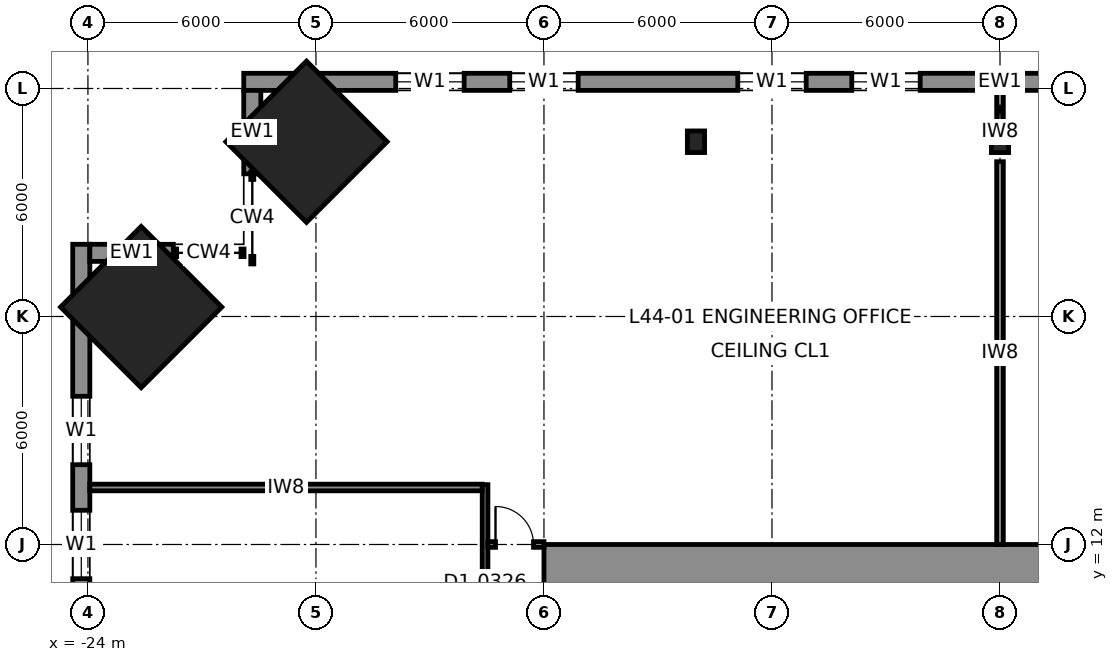
"""IFC4 building model, lengths in metres.
Left out: names, types, materials, properties, quantities, classifications, styles, units other than length and angle.
Written with IfcOpenShell. Run it as: python <this file> out.ifc"""

import sys

from ifc_helpers import new_model, si_unit, direction, frame, frame_2d, origin, origin_2d, place, context, subcontext, project, spatial, rectangle, i_section, extrude, element, fill, save


model = new_model("IFC4")
c1 = context("Model", 3, precision=1e-05, world=origin(), true_north=direction((0.0, 1.0)))
c2 = subcontext(c1, "Body", "Model", "MODEL_VIEW")
j1 = project(units=[si_unit("LENGTHUNIT", "METRE"), si_unit("PLANEANGLEUNIT", "RADIAN")], contexts=[c1])
p1 = place(None, origin())
s1 = spatial("IfcSite", under=j1, at=p1, CompositionType="ELEMENT")
p2 = place(p1, origin())
s2 = spatial("IfcBuilding", under=s1, at=p2, CompositionType="ELEMENT")
p3 = place(p2, frame((0.0, 0.0, 205.8)))
s3 = spatial("IfcBuildingStorey", under=s2, at=p3, CompositionType="ELEMENT", Elevation=205.8)
for number, where, z_axis, x_axis in (
    (1, (-22.598, 18.248, 0.0), (0.04, -0.04, 0.998), (0.707, 0.708, 0.0)),
    (2, (-18.248, 22.598, 0.0), (0.04, -0.04, 0.998), (0.708, 0.707, 0.0)),
):
    element("IfcColumn", number, at=place(p3, frame(where, z_axis=z_axis, x_axis=x_axis)), inside=s3, PredefinedType="COLUMN", context=c2, shape_type="SweptSolid", body=[
        extrude(rectangle(XDim=3.0, YDim=3.0, at=origin_2d()), origin(), (0.0, 0.0, 1.0), 4.007),
    ])
for number, where, z_axis, x_axis in (
    (3, (0.0, 22.598, 0.0), (0.0, -0.04, 0.999), (1.0, 0.0, 0.0)),
    (4, (-8.0, 22.598, 0.0), (0.0, -0.04, 0.999), (1.0, 0.0, 0.0)),
):
    element("IfcColumn", number, at=place(p3, frame(where, z_axis=z_axis, x_axis=x_axis)), inside=s3, PredefinedType="COLUMN", context=c2, shape_type="SweptSolid", body=[
        extrude(i_section(OverallWidth=0.454, OverallDepth=0.569, WebThickness=0.078, FlangeThickness=0.125, at=origin_2d()), origin(), (0.0, 0.0, 1.0), 4.003),
    ])
p4 = place(p3, frame((-12.0, 11.25, 0.0), z_axis=(0.0, 0.0, 1.0), x_axis=(1.0, 0.0, 0.0)))
e5 = element("IfcWall", 5, at=p4, inside=s3, PredefinedType="SHEAR", context=c2, shape_type="SweptSolid", body=[
    extrude(rectangle(XDim=24.0, YDim=1.5, at=frame_2d((12.0, 0.0))), origin(), (0.0, 0.0, 1.0), 4.0),
])
p5 = place(p3, frame((19.9, 24.175, 0.0), z_axis=(0.0, 0.0, 1.0), x_axis=(-1.0, 0.0, 0.0)))
e6 = element("IfcWall", 6, at=p5, inside=s3, PredefinedType="SOLIDWALL", context=c2, shape_type="SweptSolid", body=[
    extrude(rectangle(XDim=39.8, YDim=0.45, at=frame_2d((19.9, 0.0))), origin(), (0.0, 0.0, 1.0), 3.83),
])
p6 = place(p5, frame((4.0, 0.0, 0.7)))
e7 = element("IfcOpeningElement", 7, at=p6, cuts=e6, PredefinedType="OPENING", context=c2, shape_type="SweptSolid", body=[
    extrude(rectangle(XDim=1.8, YDim=2.6, at=frame_2d((0.9, 1.3))), frame((0.0, 0.235, 0.0), z_axis=(0.0, -1.0, 0.0), x_axis=(1.0, 0.0, 0.0)), (0.0, 0.0, 1.0), 0.47),
])
p7 = place(p5, frame((7.0, 0.0, 0.7)))
e8 = element("IfcOpeningElement", 8, at=p7, cuts=e6, PredefinedType="OPENING", context=c2, shape_type="SweptSolid", body=[
    extrude(rectangle(XDim=1.8, YDim=2.6, at=frame_2d((0.9, 1.3))), frame((0.0, 0.235, 0.0), z_axis=(0.0, -1.0, 0.0), x_axis=(1.0, 0.0, 0.0)), (0.0, 0.0, 1.0), 0.47),
])
p8 = place(p5, frame((13.0, 0.0, 0.7)))
e9 = element("IfcOpeningElement", 9, at=p8, cuts=e6, PredefinedType="OPENING", context=c2, shape_type="SweptSolid", body=[
    extrude(rectangle(XDim=1.8, YDim=2.6, at=frame_2d((0.9, 1.3))), frame((0.0, 0.235, 0.0), z_axis=(0.0, -1.0, 0.0), x_axis=(1.0, 0.0, 0.0)), (0.0, 0.0, 1.0), 0.47),
])
p9 = place(p5, frame((16.0, 0.0, 0.7)))
e10 = element("IfcOpeningElement", 10, at=p9, cuts=e6, PredefinedType="OPENING", context=c2, shape_type="SweptSolid", body=[
    extrude(rectangle(XDim=1.8, YDim=2.6, at=frame_2d((0.9, 1.3))), frame((0.0, 0.235, 0.0), z_axis=(0.0, -1.0, 0.0), x_axis=(1.0, 0.0, 0.0)), (0.0, 0.0, 1.0), 0.47),
])
p10 = place(p5, frame((22.0, 0.0, 0.7)))
e11 = element("IfcOpeningElement", 11, at=p10, cuts=e6, PredefinedType="OPENING", context=c2, shape_type="SweptSolid", body=[
    extrude(rectangle(XDim=1.8, YDim=2.6, at=frame_2d((0.9, 1.3))), frame((0.0, 0.235, 0.0), z_axis=(0.0, -1.0, 0.0), x_axis=(1.0, 0.0, 0.0)), (0.0, 0.0, 1.0), 0.47),
])
p11 = place(p5, frame((25.0, 0.0, 0.7)))
e12 = element("IfcOpeningElement", 12, at=p11, cuts=e6, PredefinedType="OPENING", context=c2, shape_type="SweptSolid", body=[
    extrude(rectangle(XDim=1.8, YDim=2.6, at=frame_2d((0.9, 1.3))), frame((0.0, 0.235, 0.0), z_axis=(0.0, -1.0, 0.0), x_axis=(1.0, 0.0, 0.0)), (0.0, 0.0, 1.0), 0.47),
])
p12 = place(p5, frame((31.0, 0.0, 0.7)))
e13 = element("IfcOpeningElement", 13, at=p12, cuts=e6, PredefinedType="OPENING", context=c2, shape_type="SweptSolid", body=[
    extrude(rectangle(XDim=1.8, YDim=2.6, at=frame_2d((0.9, 1.3))), frame((0.0, 0.235, 0.0), z_axis=(0.0, -1.0, 0.0), x_axis=(1.0, 0.0, 0.0)), (0.0, 0.0, 1.0), 0.47),
])
p13 = place(p5, frame((34.0, 0.0, 0.7)))
e14 = element("IfcOpeningElement", 14, at=p13, cuts=e6, PredefinedType="OPENING", context=c2, shape_type="SweptSolid", body=[
    extrude(rectangle(XDim=1.8, YDim=2.6, at=frame_2d((0.9, 1.3))), frame((0.0, 0.235, 0.0), z_axis=(0.0, -1.0, 0.0), x_axis=(1.0, 0.0, 0.0)), (0.0, 0.0, 1.0), 0.47),
])
p14 = place(p3, frame((-24.175, 19.9, 0.0), z_axis=(0.0, 0.0, 1.0), x_axis=(0.0, -1.0, 0.0)))
e15 = element("IfcWall", 15, at=p14, inside=s3, PredefinedType="SOLIDWALL", context=c2, shape_type="SweptSolid", body=[
    extrude(rectangle(XDim=39.8, YDim=0.45, at=frame_2d((19.9, 0.0))), origin(), (0.0, 0.0, 1.0), 3.83),
])
p15 = place(p14, frame((4.0, 0.0, 0.7)))
e16 = element("IfcOpeningElement", 16, at=p15, cuts=e15, PredefinedType="OPENING", context=c2, shape_type="SweptSolid", body=[
    extrude(rectangle(XDim=1.8, YDim=2.6, at=frame_2d((0.9, 1.3))), frame((0.0, 0.235, 0.0), z_axis=(0.0, -1.0, 0.0), x_axis=(1.0, 0.0, 0.0)), (0.0, 0.0, 1.0), 0.47),
])
p16 = place(p14, frame((7.0, 0.0, 0.7)))
e17 = element("IfcOpeningElement", 17, at=p16, cuts=e15, PredefinedType="OPENING", context=c2, shape_type="SweptSolid", body=[
    extrude(rectangle(XDim=1.8, YDim=2.6, at=frame_2d((0.9, 1.3))), frame((0.0, 0.235, 0.0), z_axis=(0.0, -1.0, 0.0), x_axis=(1.0, 0.0, 0.0)), (0.0, 0.0, 1.0), 0.47),
])
p17 = place(p14, frame((13.0, 0.0, 0.7)))
e18 = element("IfcOpeningElement", 18, at=p17, cuts=e15, PredefinedType="OPENING", context=c2, shape_type="SweptSolid", body=[
    extrude(rectangle(XDim=1.8, YDim=2.6, at=frame_2d((0.9, 1.3))), frame((0.0, 0.235, 0.0), z_axis=(0.0, -1.0, 0.0), x_axis=(1.0, 0.0, 0.0)), (0.0, 0.0, 1.0), 0.47),
])
p18 = place(p14, frame((16.0, 0.0, 0.7)))
e19 = element("IfcOpeningElement", 19, at=p18, cuts=e15, PredefinedType="OPENING", context=c2, shape_type="SweptSolid", body=[
    extrude(rectangle(XDim=1.8, YDim=2.6, at=frame_2d((0.9, 1.3))), frame((0.0, 0.235, 0.0), z_axis=(0.0, -1.0, 0.0), x_axis=(1.0, 0.0, 0.0)), (0.0, 0.0, 1.0), 0.47),
])
p19 = place(p14, frame((22.0, 0.0, 0.7)))
e20 = element("IfcOpeningElement", 20, at=p19, cuts=e15, PredefinedType="OPENING", context=c2, shape_type="SweptSolid", body=[
    extrude(rectangle(XDim=1.8, YDim=2.6, at=frame_2d((0.9, 1.3))), frame((0.0, 0.235, 0.0), z_axis=(0.0, -1.0, 0.0), x_axis=(1.0, 0.0, 0.0)), (0.0, 0.0, 1.0), 0.47),
])
p20 = place(p14, frame((25.0, 0.0, 0.7)))
e21 = element("IfcOpeningElement", 21, at=p20, cuts=e15, PredefinedType="OPENING", context=c2, shape_type="SweptSolid", body=[
    extrude(rectangle(XDim=1.8, YDim=2.6, at=frame_2d((0.9, 1.3))), frame((0.0, 0.235, 0.0), z_axis=(0.0, -1.0, 0.0), x_axis=(1.0, 0.0, 0.0)), (0.0, 0.0, 1.0), 0.47),
])
p21 = place(p14, frame((31.0, 0.0, 0.7)))
e22 = element("IfcOpeningElement", 22, at=p21, cuts=e15, PredefinedType="OPENING", context=c2, shape_type="SweptSolid", body=[
    extrude(rectangle(XDim=1.8, YDim=2.6, at=frame_2d((0.9, 1.3))), frame((0.0, 0.235, 0.0), z_axis=(0.0, -1.0, 0.0), x_axis=(1.0, 0.0, 0.0)), (0.0, 0.0, 1.0), 0.47),
])
p22 = place(p14, frame((34.0, 0.0, 0.7)))
e23 = element("IfcOpeningElement", 23, at=p22, cuts=e15, PredefinedType="OPENING", context=c2, shape_type="SweptSolid", body=[
    extrude(rectangle(XDim=1.8, YDim=2.6, at=frame_2d((0.9, 1.3))), frame((0.0, 0.235, 0.0), z_axis=(0.0, -1.0, 0.0), x_axis=(1.0, 0.0, 0.0)), (0.0, 0.0, 1.0), 0.47),
])
for number, where, z_axis, x_axis in (
    (24, (-19.675, 21.754, 0.0), (0.0, 0.0, 1.0), (0.0, 1.0, 0.0)),
    (25, (-21.754, 19.675, 0.0), (0.0, 0.0, 1.0), (-1.0, 0.0, 0.0)),
):
    element("IfcWall", number, at=place(p3, frame(where, z_axis=z_axis, x_axis=x_axis)), inside=s3, PredefinedType="SOLIDWALL", context=c2, shape_type="SweptSolid", body=[
        extrude(rectangle(XDim=2.196, YDim=0.45, at=frame_2d((1.098, 0.0))), origin(), (0.0, 0.0, 1.0), 3.83),
    ])
p23 = place(p3, frame((-13.55, 13.575, 0.0), z_axis=(0.0, 0.0, 1.0), x_axis=(0.0, -1.0, 0.0)))
e26 = element("IfcWall", 26, at=p23, inside=s3, PredefinedType="PARTITIONING", context=c2, shape_type="SweptSolid", body=[
    extrude(rectangle(XDim=27.15, YDim=0.15, at=frame_2d((13.575, 0.0))), origin(), (0.0, 0.0, 1.0), 3.83),
])
p24 = place(p23, frame((22.975, 0.0, 0.0)))
e27 = element("IfcOpeningElement", 27, at=p24, cuts=e26, PredefinedType="OPENING", context=c2, shape_type="SweptSolid", body=[
    extrude(rectangle(XDim=1.0, YDim=2.3, at=frame_2d((0.5, 1.15))), frame((0.0, 0.085, 0.0), z_axis=(0.0, -1.0, 0.0), x_axis=(1.0, 0.0, 0.0)), (0.0, 0.0, 1.0), 0.17),
])
p25 = place(p23, frame((19.775, 0.0, 0.0)))
e28 = element("IfcOpeningElement", 28, at=p25, cuts=e26, PredefinedType="OPENING", context=c2, shape_type="SweptSolid", body=[
    extrude(rectangle(XDim=1.0, YDim=2.3, at=frame_2d((0.5, 1.15))), frame((0.0, 0.085, 0.0), z_axis=(0.0, -1.0, 0.0), x_axis=(1.0, 0.0, 0.0)), (0.0, 0.0, 1.0), 0.17),
])
p26 = place(p23, frame((11.525, 0.0, 0.0)))
e29 = element("IfcOpeningElement", 29, at=p26, cuts=e26, PredefinedType="OPENING", context=c2, shape_type="SweptSolid", body=[
    extrude(rectangle(XDim=1.0, YDim=2.3, at=frame_2d((0.5, 1.15))), frame((0.0, 0.085, 0.0), z_axis=(0.0, -1.0, 0.0), x_axis=(1.0, 0.0, 0.0)), (0.0, 0.0, 1.0), 0.17),
])
p27 = place(p23, frame((3.175, 0.0, 0.0)))
e30 = element("IfcOpeningElement", 30, at=p27, cuts=e26, PredefinedType="OPENING", context=c2, shape_type="SweptSolid", body=[
    extrude(rectangle(XDim=1.0, YDim=2.3, at=frame_2d((0.5, 1.15))), frame((0.0, 0.085, 0.0), z_axis=(0.0, -1.0, 0.0), x_axis=(1.0, 0.0, 0.0)), (0.0, 0.0, 1.0), 0.17),
])
p28 = place(p23, frame((16.825, 0.0, 0.0)))
e31 = element("IfcOpeningElement", 31, at=p28, cuts=e26, PredefinedType="OPENING", context=c2, shape_type="SweptSolid", body=[
    extrude(rectangle(XDim=1.0, YDim=2.3, at=frame_2d((0.5, 1.15))), frame((0.0, 0.085, 0.0), z_axis=(0.0, -1.0, 0.0), x_axis=(1.0, 0.0, 0.0)), (0.0, 0.0, 1.0), 0.17),
])
p29 = place(p23, frame((8.325, 0.0, 0.0)))
e32 = element("IfcOpeningElement", 32, at=p29, cuts=e26, PredefinedType="OPENING", context=c2, shape_type="SweptSolid", body=[
    extrude(rectangle(XDim=1.0, YDim=2.3, at=frame_2d((0.5, 1.15))), frame((0.0, 0.085, 0.0), z_axis=(0.0, -1.0, 0.0), x_axis=(1.0, 0.0, 0.0)), (0.0, 0.0, 1.0), 0.17),
])
p30 = place(p3, frame((-13.475, 12.0, 0.0), z_axis=(0.0, 0.0, 1.0), x_axis=(1.0, 0.0, 0.0)))
e33 = element("IfcWall", 33, at=p30, inside=s3, PredefinedType="PARTITIONING", context=c2, shape_type="SweptSolid", body=[
    extrude(rectangle(XDim=1.475, YDim=0.15, at=frame_2d((0.738, 0.0))), origin(), (0.0, 0.0, 1.0), 3.83),
])
p31 = place(p30, frame((0.2, 0.0, 0.0)))
e34 = element("IfcOpeningElement", 34, at=p31, cuts=e33, PredefinedType="OPENING", context=c2, shape_type="SweptSolid", body=[
    extrude(rectangle(XDim=1.0, YDim=2.3, at=frame_2d((0.5, 1.15))), frame((0.0, 0.085, 0.0), z_axis=(0.0, -1.0, 0.0), x_axis=(1.0, 0.0, 0.0)), (0.0, 0.0, 1.0), 0.17),
])
p32 = place(p3, frame((-23.95, 13.5, 0.0), z_axis=(0.0, 0.0, 1.0), x_axis=(1.0, 0.0, 0.0)))
e35 = element("IfcWall", 35, at=p32, inside=s3, PredefinedType="PARTITIONING", context=c2, shape_type="SweptSolid", body=[
    extrude(rectangle(XDim=10.325, YDim=0.175, at=frame_2d((5.163, 0.0))), origin(), (0.0, 0.0, 1.0), 3.83),
])
p33 = place(p3, frame((0.0, 12.0, 0.0), z_axis=(0.0, 0.0, 1.0), x_axis=(0.0, 1.0, 0.0)))
e36 = element("IfcWall", 36, at=p33, inside=s3, PredefinedType="PARTITIONING", context=c2, shape_type="SweptSolid", body=[
    extrude(rectangle(XDim=10.073, YDim=0.175, at=frame_2d((5.037, 0.0))), origin(), (0.0, 0.0, 1.0), 3.04),
])
p34 = place(p3, frame((0.0, 22.962, 0.0), z_axis=(0.0, 0.0, 1.0), x_axis=(0.0, 1.0, 0.0)))
e37 = element("IfcWall", 37, at=p34, inside=s3, PredefinedType="PARTITIONING", context=c2, shape_type="SweptSolid", body=[
    extrude(rectangle(XDim=0.988, YDim=0.175, at=frame_2d((0.494, 0.0))), origin(), (0.0, 0.0, 1.0), 3.83),
])
p35 = place(p10, origin())
e38 = element("IfcWindow", 38, at=p35, inside=s3, PartitioningType="SINGLE_PANEL", PredefinedType="WINDOW", context=c2, shape_type="SweptSolid", body=[
    extrude(rectangle(XDim=1.8, YDim=2.6, at=frame_2d((0.9, 1.3))), frame((0.0, 0.03, 0.0), z_axis=(0.0, -1.0, 0.0), x_axis=(1.0, 0.0, 0.0)), (0.0, 0.0, 1.0), 0.06),
])
fill(e11, e38)
p36 = place(p11, origin())
e39 = element("IfcWindow", 39, at=p36, inside=s3, PartitioningType="SINGLE_PANEL", PredefinedType="WINDOW", context=c2, shape_type="SweptSolid", body=[
    extrude(rectangle(XDim=1.8, YDim=2.6, at=frame_2d((0.9, 1.3))), frame((0.0, 0.03, 0.0), z_axis=(0.0, -1.0, 0.0), x_axis=(1.0, 0.0, 0.0)), (0.0, 0.0, 1.0), 0.06),
])
fill(e12, e39)
p37 = place(p12, origin())
e40 = element("IfcWindow", 40, at=p37, inside=s3, PartitioningType="SINGLE_PANEL", PredefinedType="WINDOW", context=c2, shape_type="SweptSolid", body=[
    extrude(rectangle(XDim=1.8, YDim=2.6, at=frame_2d((0.9, 1.3))), frame((0.0, 0.03, 0.0), z_axis=(0.0, -1.0, 0.0), x_axis=(1.0, 0.0, 0.0)), (0.0, 0.0, 1.0), 0.06),
])
fill(e13, e40)
p38 = place(p13, origin())
e41 = element("IfcWindow", 41, at=p38, inside=s3, PartitioningType="SINGLE_PANEL", PredefinedType="WINDOW", context=c2, shape_type="SweptSolid", body=[
    extrude(rectangle(XDim=1.8, YDim=2.6, at=frame_2d((0.9, 1.3))), frame((0.0, 0.03, 0.0), z_axis=(0.0, -1.0, 0.0), x_axis=(1.0, 0.0, 0.0)), (0.0, 0.0, 1.0), 0.06),
])
fill(e14, e41)
p39 = place(p15, origin())
e42 = element("IfcWindow", 42, at=p39, inside=s3, PartitioningType="SINGLE_PANEL", PredefinedType="WINDOW", context=c2, shape_type="SweptSolid", body=[
    extrude(rectangle(XDim=1.8, YDim=2.6, at=frame_2d((0.9, 1.3))), frame((0.0, 0.03, 0.0), z_axis=(0.0, -1.0, 0.0), x_axis=(1.0, 0.0, 0.0)), (0.0, 0.0, 1.0), 0.06),
])
fill(e16, e42)
p40 = place(p16, origin())
e43 = element("IfcWindow", 43, at=p40, inside=s3, PartitioningType="SINGLE_PANEL", PredefinedType="WINDOW", context=c2, shape_type="SweptSolid", body=[
    extrude(rectangle(XDim=1.8, YDim=2.6, at=frame_2d((0.9, 1.3))), frame((0.0, 0.03, 0.0), z_axis=(0.0, -1.0, 0.0), x_axis=(1.0, 0.0, 0.0)), (0.0, 0.0, 1.0), 0.06),
])
fill(e17, e43)
p41 = place(p31, origin())
e44 = element("IfcDoor", 44, at=p41, inside=s3, OperationType="SINGLE_SWING_LEFT", PredefinedType="DOOR", context=c2, shape_type="SweptSolid", body=[
    extrude(rectangle(XDim=1.0, YDim=2.3, at=frame_2d((0.5, 1.15))), frame((0.0, 0.025, 0.0), z_axis=(0.0, -1.0, 0.0), x_axis=(1.0, 0.0, 0.0)), (0.0, 0.0, 1.0), 0.05),
])
fill(e34, e44)
save(model, sys.argv[1])
